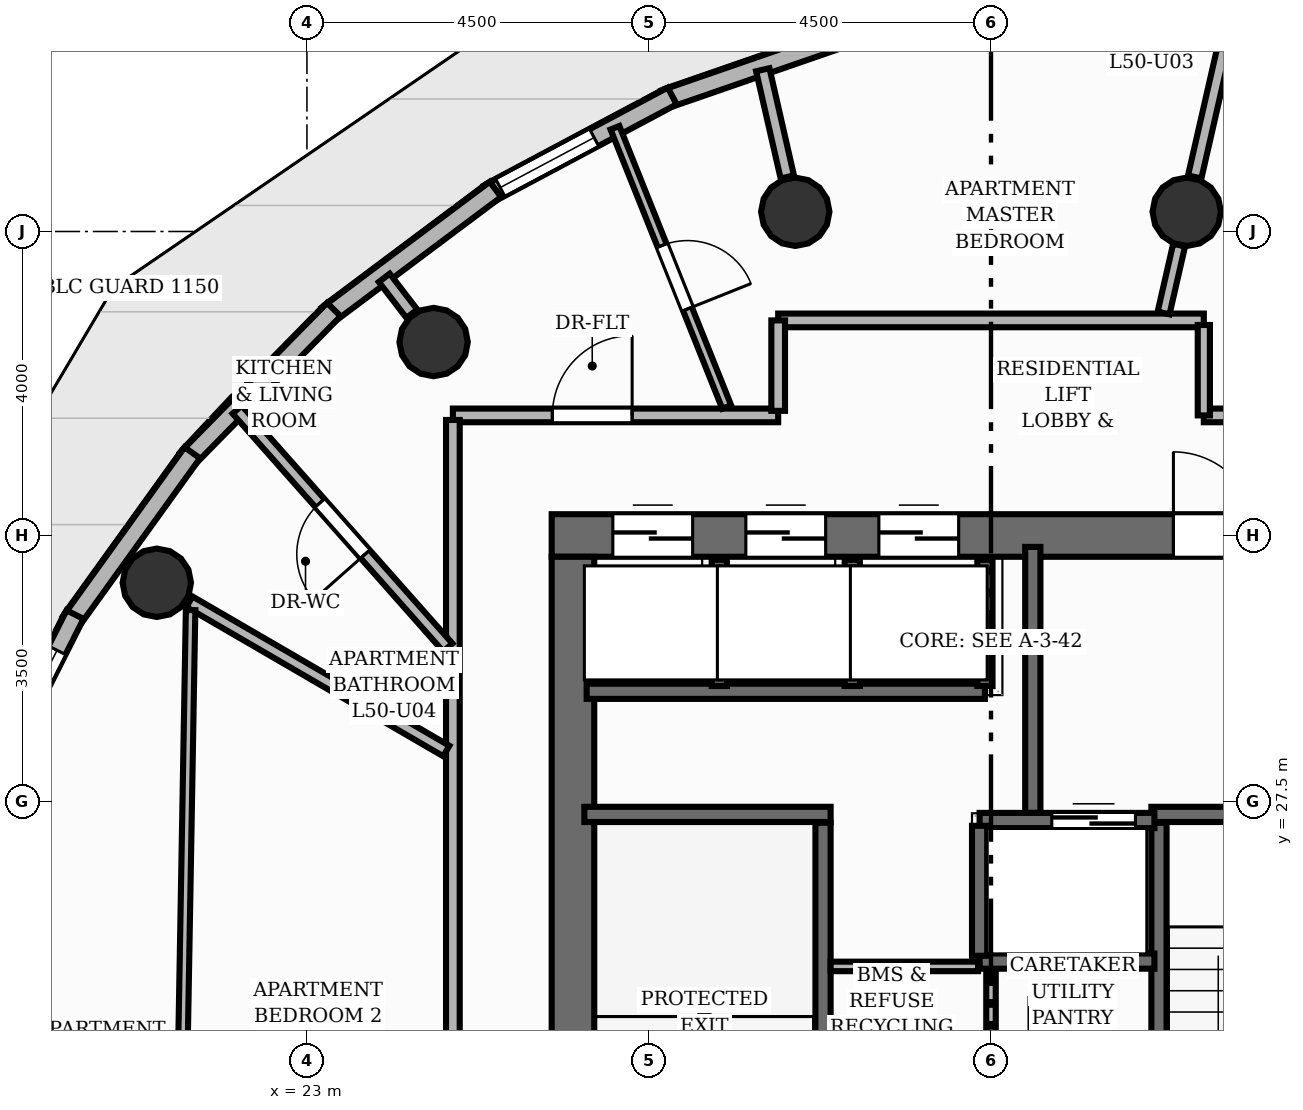
"""IFC4 building model, lengths in metres.
Left out: names, types, materials, properties, quantities, classifications, styles, units other than length and angle.
Written with IfcOpenShell. Run it as: python <this file> out.ifc"""

import sys

from ifc_helpers import new_model, si_unit, direction, frame, frame_2d, origin, origin_2d, place, context, subcontext, project, spatial, rectangle, circle, extrude, element, fill, save


model = new_model("IFC4")
c1 = context("Model", 3, precision=1e-05, world=origin(), true_north=direction((0.0, 1.0)))
c2 = subcontext(c1, "Body", "Model", "MODEL_VIEW")
j1 = project(units=[si_unit("LENGTHUNIT", "METRE"), si_unit("PLANEANGLEUNIT", "RADIAN")], contexts=[c1])
p1 = place(None, origin())
s1 = spatial("IfcSite", under=j1, at=p1, CompositionType="ELEMENT")
p2 = place(p1, origin())
s2 = spatial("IfcBuilding", under=s1, at=p2, CompositionType="ELEMENT")
p3 = place(p2, frame((0.0, 0.0, 169.44)))
s3 = spatial("IfcBuildingStorey", under=s2, at=p3, CompositionType="ELEMENT", Elevation=169.44)
p4 = place(p3, frame((26.22, 31.0, 0.0), z_axis=(0.0, 0.0, 1.0), x_axis=(1.0, 0.0, 0.0)))
e1 = element("IfcWall", 1, at=p4, inside=s3, PredefinedType="SHEAR", context=c2, shape_type="SweptSolid", body=[
    extrude(rectangle(XDim=11.56, YDim=0.56, at=frame_2d((5.78, 0.0))), origin(), (0.0, 0.0, 1.0), 3.2),
])
p5 = place(p4, frame((8.18, 0.0, 0.0)))
e2 = element("IfcOpeningElement", 2, at=p5, cuts=e1, PredefinedType="OPENING", context=c2, shape_type="SweptSolid", body=[
    extrude(rectangle(XDim=1.1, YDim=2.15, at=frame_2d((0.55, 1.075))), frame((0.0, 0.29, 0.0), z_axis=(0.0, -1.0, 0.0), x_axis=(1.0, 0.0, 0.0)), (0.0, 0.0, 1.0), 0.58),
])
p6 = place(p4, frame((0.805, 0.0, 0.0)))
e3 = element("IfcOpeningElement", 3, at=p6, cuts=e1, PredefinedType="OPENING", context=c2, shape_type="SweptSolid", body=[
    extrude(rectangle(XDim=1.05, YDim=2.15, at=frame_2d((0.525, 1.075))), frame((0.0, 0.29, 0.0), z_axis=(0.0, -1.0, 0.0), x_axis=(1.0, 0.0, 0.0)), (0.0, 0.0, 1.0), 0.58),
])
p7 = place(p4, frame((2.555, 0.0, 0.0)))
e4 = element("IfcOpeningElement", 4, at=p7, cuts=e1, PredefinedType="OPENING", context=c2, shape_type="SweptSolid", body=[
    extrude(rectangle(XDim=1.05, YDim=2.15, at=frame_2d((0.525, 1.075))), frame((0.0, 0.29, 0.0), z_axis=(0.0, -1.0, 0.0), x_axis=(1.0, 0.0, 0.0)), (0.0, 0.0, 1.0), 0.58),
])
p8 = place(p4, frame((4.305, 0.0, 0.0)))
e5 = element("IfcOpeningElement", 5, at=p8, cuts=e1, PredefinedType="OPENING", context=c2, shape_type="SweptSolid", body=[
    extrude(rectangle(XDim=1.05, YDim=2.15, at=frame_2d((0.525, 1.075))), frame((0.0, 0.29, 0.0), z_axis=(0.0, -1.0, 0.0), x_axis=(1.0, 0.0, 0.0)), (0.0, 0.0, 1.0), 0.58),
])
p9 = place(p3, frame((26.5, 17.28, 0.0), z_axis=(0.0, 0.0, 1.0), x_axis=(0.0, 1.0, 0.0)))
e6 = element("IfcWall", 6, at=p9, inside=s3, PredefinedType="SHEAR", context=c2, shape_type="SweptSolid", body=[
    extrude(rectangle(XDim=13.44, YDim=0.56, at=frame_2d((6.72, 0.0))), origin(), (0.0, 0.0, 1.0), 3.2),
])
for number, where, z_axis, x_axis in (
    (7, (34.575, 35.26, 0.0), (0.0, 0.0, 1.0), (1.0, 0.0, 0.0)),
    (8, (29.425, 35.26, 0.0), (0.0, 0.0, 1.0), (1.0, 0.0, 0.0)),
    (9, (24.667, 33.545, 0.0), (0.0, 0.0, 1.0), (1.0, 0.0, 0.0)),
    (10, (21.025, 30.378, 0.0), (0.0, 0.0, 1.0), (1.0, 0.0, 0.0)),
):
    element("IfcColumn", number, at=place(p3, frame(where, z_axis=z_axis, x_axis=x_axis)), inside=s3, PredefinedType="COLUMN", context=c2, shape_type="SweptSolid", body=[
        extrude(circle(Radius=0.45, at=origin_2d()), origin(), (0.0, 0.0, 1.0), 3.2),
    ])
p10 = place(p3, frame((27.705, 36.739, 0.0), z_axis=(0.0, 0.0, 1.0), x_axis=(0.945016150651, 0.327023661236, 0.0)))
e11 = element("IfcWall", 11, at=p10, inside=s3, PredefinedType="SOLIDWALL", context=c2, shape_type="SweptSolid", body=[
    extrude(rectangle(XDim=2.702, YDim=0.25, at=frame_2d((1.351, 0.0))), origin(), (0.0, 0.0, 1.0), 2.96),
])
p11 = place(p3, frame((25.388, 35.495, 0.0), z_axis=(0.0, 0.0, 1.0), x_axis=(0.88257494418, 0.47017174299, 0.0)))
e12 = element("IfcWall", 12, at=p11, inside=s3, PredefinedType="SOLIDWALL", context=c2, shape_type="SweptSolid", body=[
    extrude(rectangle(XDim=2.739, YDim=0.25, at=frame_2d((1.369, 0.0))), origin(), (0.0, 0.0, 1.0), 2.96),
])
p12 = place(p11, frame((0.175, 0.0, 0.85)))
e13 = element("IfcOpeningElement", 13, at=p12, cuts=e12, PredefinedType="OPENING", context=c2, shape_type="SweptSolid", body=[
    extrude(rectangle(XDim=1.4, YDim=1.55, at=frame_2d((0.7, 0.775))), frame((0.0, 0.135, 0.0), z_axis=(0.0, -1.0, 0.0), x_axis=(1.0, 0.0, 0.0)), (0.0, 0.0, 1.0), 0.27),
])
p13 = place(p3, frame((23.272, 33.901, 0.0), z_axis=(0.0, 0.0, 1.0), x_axis=(0.800636941996, 0.599149803564, 0.0)))
e14 = element("IfcWall", 14, at=p13, inside=s3, PredefinedType="SOLIDWALL", context=c2, shape_type="SweptSolid", body=[
    extrude(rectangle(XDim=2.758, YDim=0.25, at=frame_2d((1.379, 0.0))), origin(), (0.0, 0.0, 1.0), 2.96),
])
p14 = place(p3, frame((21.421, 32.005, 0.0), z_axis=(0.0, 0.0, 1.0), x_axis=(0.700794099323, 0.713363603189, 0.0)))
e15 = element("IfcWall", 15, at=p14, inside=s3, PredefinedType="SOLIDWALL", context=c2, shape_type="SweptSolid", body=[
    extrude(rectangle(XDim=2.758, YDim=0.25, at=frame_2d((1.379, 0.0))), origin(), (0.0, 0.0, 1.0), 2.96),
])
p15 = place(p3, frame((19.892, 29.865, 0.0), z_axis=(0.0, 0.0, 1.0), x_axis=(0.583975860001, 0.811771023711, 0.0)))
e16 = element("IfcWall", 16, at=p15, inside=s3, PredefinedType="SOLIDWALL", context=c2, shape_type="SweptSolid", body=[
    extrude(rectangle(XDim=2.738, YDim=0.25, at=frame_2d((1.369, 0.0))), origin(), (0.0, 0.0, 1.0), 2.96),
])
p16 = place(p3, frame((18.732, 27.547, 0.0), z_axis=(0.0, 0.0, 1.0), x_axis=(0.450391703917, 0.892831066352, 0.0)))
e17 = element("IfcWall", 17, at=p16, inside=s3, PredefinedType="SOLIDWALL", context=c2, shape_type="SweptSolid", body=[
    extrude(rectangle(XDim=2.702, YDim=0.25, at=frame_2d((1.351, 0.0))), origin(), (0.0, 0.0, 1.0), 2.96),
])
p17 = place(p16, frame((0.526, 0.0, 0.85)))
e18 = element("IfcOpeningElement", 18, at=p17, cuts=e17, PredefinedType="OPENING", context=c2, shape_type="SweptSolid", body=[
    extrude(rectangle(XDim=1.65, YDim=1.55, at=frame_2d((0.825, 0.775))), frame((0.0, 0.135, 0.0), z_axis=(0.0, -1.0, 0.0), x_axis=(1.0, 0.0, 0.0)), (0.0, 0.0, 1.0), 0.27),
])
p18 = place(p3, frame((29.79, 20.78, 0.0), z_axis=(0.0, 0.0, 1.0), x_axis=(0.0, 1.0, 0.0)))
e19 = element("IfcWall", 19, at=p18, inside=s3, PredefinedType="SHEAR", context=c2, shape_type="SweptSolid", body=[
    extrude(rectangle(XDim=6.44, YDim=0.2, at=frame_2d((3.22, 0.0))), origin(), (0.0, 0.0, 1.0), 3.2),
])
p19 = place(p3, frame((26.65, 27.33, 0.0), z_axis=(0.0, 0.0, 1.0), x_axis=(1.0, 0.0, 0.0)))
e20 = element("IfcWall", 20, at=p19, inside=s3, PredefinedType="SHEAR", context=c2, shape_type="SweptSolid", body=[
    extrude(rectangle(XDim=3.24, YDim=0.2, at=frame_2d((1.62, 0.0))), origin(), (0.0, 0.0, 1.0), 3.2),
])
p20 = place(p3, frame((34.21, 20.78, 0.0), z_axis=(0.0, 0.0, 1.0), x_axis=(0.0, 1.0, 0.0)))
e21 = element("IfcWall", 21, at=p20, inside=s3, PredefinedType="SHEAR", context=c2, shape_type="SweptSolid", body=[
    extrude(rectangle(XDim=6.44, YDim=0.2, at=frame_2d((3.22, 0.0))), origin(), (0.0, 0.0, 1.0), 3.2),
])
p21 = place(p3, frame((34.11, 27.33, 0.0), z_axis=(0.0, 0.0, 1.0), x_axis=(1.0, 0.0, 0.0)))
e22 = element("IfcWall", 22, at=p21, inside=s3, PredefinedType="SHEAR", context=c2, shape_type="SweptSolid", body=[
    extrude(rectangle(XDim=3.24, YDim=0.2, at=frame_2d((1.62, 0.0))), origin(), (0.0, 0.0, 1.0), 3.2),
])
p22 = place(p21, frame((1.135, 0.0, 0.0)))
e23 = element("IfcOpeningElement", 23, at=p22, cuts=e22, PredefinedType="OPENING", context=c2, shape_type="SweptSolid", body=[
    extrude(rectangle(XDim=1.05, YDim=2.15, at=frame_2d((0.525, 1.075))), frame((0.0, 0.11, 0.0), z_axis=(0.0, -1.0, 0.0), x_axis=(1.0, 0.0, 0.0)), (0.0, 0.0, 1.0), 0.22),
])
p23 = place(p3, frame((32.55, 27.35, 0.0), z_axis=(0.0, 0.0, 1.0), x_axis=(0.0, 1.0, 0.0)))
e24 = element("IfcWall", 24, at=p23, inside=s3, PredefinedType="SHEAR", context=c2, shape_type="SweptSolid", body=[
    extrude(rectangle(XDim=3.5, YDim=0.2, at=frame_2d((1.75, 0.0))), origin(), (0.0, 0.0, 1.0), 3.2),
])
p24 = place(p3, frame((31.85, 27.25, 0.0), z_axis=(0.0, 0.0, 1.0), x_axis=(1.0, 0.0, 0.0)))
e25 = element("IfcWall", 25, at=p24, inside=s3, PredefinedType="SHEAR", context=c2, shape_type="SweptSolid", body=[
    extrude(rectangle(XDim=2.3, YDim=0.2, at=frame_2d((1.15, 0.0))), origin(), (0.0, 0.0, 1.0), 3.2),
])
p25 = place(p24, frame((0.95, 0.0, 0.0)))
e26 = element("IfcOpeningElement", 26, at=p25, cuts=e25, PredefinedType="OPENING", context=c2, shape_type="SweptSolid", body=[
    extrude(rectangle(XDim=1.1, YDim=2.15, at=frame_2d((0.55, 1.075))), frame((0.0, 0.11, 0.0), z_axis=(0.0, -1.0, 0.0), x_axis=(1.0, 0.0, 0.0)), (0.0, 0.0, 1.0), 0.22),
])
p26 = place(p3, frame((31.85, 25.4, 0.0), z_axis=(0.0, 0.0, 1.0), x_axis=(1.0, 0.0, 0.0)))
e27 = element("IfcWall", 27, at=p26, inside=s3, PredefinedType="SHEAR", context=c2, shape_type="SweptSolid", body=[
    extrude(rectangle(XDim=2.3, YDim=0.2, at=frame_2d((1.15, 0.0))), origin(), (0.0, 0.0, 1.0), 3.2),
])
p27 = place(p3, frame((31.85, 25.47, 0.0), z_axis=(0.0, 0.0, 1.0), x_axis=(0.0, 1.0, 0.0)))
e28 = element("IfcWall", 28, at=p27, inside=s3, PredefinedType="SHEAR", context=c2, shape_type="SweptSolid", body=[
    extrude(rectangle(XDim=1.71, YDim=0.2, at=frame_2d((0.855, 0.0))), origin(), (0.0, 0.0, 1.0), 3.2),
])
p28 = place(p3, frame((26.68, 28.95, 0.0), z_axis=(0.0, 0.0, 1.0), x_axis=(1.0, 0.0, 0.0)))
e29 = element("IfcWall", 29, at=p28, inside=s3, PredefinedType="SHEAR", context=c2, shape_type="SweptSolid", body=[
    extrude(rectangle(XDim=5.24, YDim=0.2, at=frame_2d((2.62, 0.0))), origin(), (0.0, 0.0, 1.0), 3.2),
])
for number, where, z_axis, x_axis in (
    (30, (31.92, 29.02, 0.0), (0.0, 0.0, 1.0), (0.0, 1.0, 0.0)),
    (31, (28.425, 29.02, 0.0), (0.0, 0.0, 1.0), (0.0, 1.0, 0.0)),
    (32, (30.175, 29.02, 0.0), (0.0, 0.0, 1.0), (0.0, 1.0, 0.0)),
):
    element("IfcWall", number, at=place(p3, frame(where, z_axis=z_axis, x_axis=x_axis)), inside=s3, PredefinedType="SHEAR", context=c2, shape_type="SweptSolid", body=[
        extrude(rectangle(XDim=1.66, YDim=0.2, at=frame_2d((0.83, 0.0))), origin(), (0.0, 0.0, 1.0), 3.2),
    ])
p29 = place(p3, frame((32.0, 22.72, 0.0), z_axis=(0.0, 0.0, 1.0), x_axis=(0.0, 1.0, 0.0)))
e33 = element("IfcWall", 33, at=p29, inside=s3, PredefinedType="PARTITIONING", context=c2, shape_type="SweptSolid", body=[
    extrude(rectangle(XDim=2.52, YDim=0.125, at=frame_2d((1.26, 0.0))), origin(), (0.0, 0.0, 1.0), 2.955),
])
p30 = place(p29, frame((0.18, 0.0, 0.0)))
e34 = element("IfcOpeningElement", 34, at=p30, cuts=e33, PredefinedType="OPENING", context=c2, shape_type="SweptSolid", body=[
    extrude(rectangle(XDim=0.9, YDim=2.1, at=frame_2d((0.45, 1.05))), frame((0.0, 0.073, 0.0), z_axis=(0.0, -1.0, 0.0), x_axis=(1.0, 0.0, 0.0)), (0.0, 0.0, 1.0), 0.145),
])
p31 = place(p3, frame((29.89, 25.33, 0.0), z_axis=(0.0, 0.0, 1.0), x_axis=(1.0, 0.0, 0.0)))
e35 = element("IfcWall", 35, at=p31, inside=s3, PredefinedType="PARTITIONING", context=c2, shape_type="SweptSolid", body=[
    extrude(rectangle(XDim=1.94, YDim=0.125, at=frame_2d((0.97, 0.0))), origin(), (0.0, 0.0, 1.0), 2.955),
])
p32 = place(p3, frame((34.68, 35.718, 0.0), z_axis=(0.0, 0.0, 1.0), x_axis=(0.222998449778, 0.974818799263, 0.0)))
e36 = element("IfcWall", 36, at=p32, inside=s3, PredefinedType="PARTITIONING", context=c2, shape_type="SweptSolid", body=[
    extrude(rectangle(XDim=2.329, YDim=0.18, at=frame_2d((1.164, 0.0))), origin(), (0.0, 0.0, 1.0), 2.404),
])
p33 = place(p3, frame((29.32, 35.718, 0.0), z_axis=(0.0, 0.0, 1.0), x_axis=(-0.22299884629, 0.974818708557, 0.0)))
e37 = element("IfcWall", 37, at=p33, inside=s3, PredefinedType="PARTITIONING", context=c2, shape_type="SweptSolid", body=[
    extrude(rectangle(XDim=1.447, YDim=0.18, at=frame_2d((0.724, 0.0))), origin(), (0.0, 0.0, 1.0), 2.404),
])
p34 = place(p3, frame((24.38, 33.918, 0.0), z_axis=(0.0, 0.0, 1.0), x_axis=(-0.609274747308, 0.792959193334, 0.0)))
e38 = element("IfcWall", 38, at=p34, inside=s3, PredefinedType="PARTITIONING", context=c2, shape_type="SweptSolid", body=[
    extrude(rectangle(XDim=0.595, YDim=0.18, at=frame_2d((0.298, 0.0))), origin(), (0.0, 0.0, 1.0), 2.404),
])
p35 = place(p3, frame((34.8, 32.58, 0.0), z_axis=(0.0, 0.0, 1.0), x_axis=(1.0, 0.0, 0.0)))
e39 = element("IfcWall", 39, at=p35, inside=s3, PredefinedType="PARTITIONING", context=c2, shape_type="SweptSolid", body=[
    extrude(rectangle(XDim=4.28, YDim=0.18, at=frame_2d((2.14, 0.0))), origin(), (0.0, 0.0, 1.0), 2.955),
])
p36 = place(p35, frame((1.769, 0.0, 0.0)))
e40 = element("IfcOpeningElement", 40, at=p36, cuts=e39, PredefinedType="OPENING", context=c2, shape_type="SweptSolid", body=[
    extrude(rectangle(XDim=1.05, YDim=2.15, at=frame_2d((0.525, 1.075))), frame((0.0, 0.1, 0.0), z_axis=(0.0, -1.0, 0.0), x_axis=(1.0, 0.0, 0.0)), (0.0, 0.0, 1.0), 0.2),
])
p37 = place(p3, frame((29.2, 33.83, 0.0), z_axis=(0.0, 0.0, 1.0), x_axis=(1.0, 0.0, 0.0)))
e41 = element("IfcWall", 41, at=p37, inside=s3, PredefinedType="PARTITIONING", context=c2, shape_type="SweptSolid", body=[
    extrude(rectangle(XDim=5.6, YDim=0.18, at=frame_2d((2.8, 0.0))), origin(), (0.0, 0.0, 1.0), 2.955),
])
p38 = place(p3, frame((34.8, 33.77, 0.0), z_axis=(0.0, 0.0, 1.0), x_axis=(0.0, -1.0, 0.0)))
e42 = element("IfcWall", 42, at=p38, inside=s3, PredefinedType="PLUMBINGWALL", context=c2, shape_type="SweptSolid", body=[
    extrude(rectangle(XDim=1.19, YDim=0.16, at=frame_2d((0.595, 0.0))), origin(), (0.0, 0.0, 1.0), 2.955),
])
p39 = place(p3, frame((24.92, 32.58, 0.0), z_axis=(0.0, 0.0, 1.0), x_axis=(1.0, 0.0, 0.0)))
e43 = element("IfcWall", 43, at=p39, inside=s3, PredefinedType="PARTITIONING", context=c2, shape_type="SweptSolid", body=[
    extrude(rectangle(XDim=4.28, YDim=0.18, at=frame_2d((2.14, 0.0))), origin(), (0.0, 0.0, 1.0), 2.955),
])
p40 = place(p39, frame((1.309, 0.0, 0.0)))
e44 = element("IfcOpeningElement", 44, at=p40, cuts=e43, PredefinedType="OPENING", context=c2, shape_type="SweptSolid", body=[
    extrude(rectangle(XDim=1.05, YDim=2.15, at=frame_2d((0.525, 1.075))), frame((0.0, 0.1, 0.0), z_axis=(0.0, -1.0, 0.0), x_axis=(1.0, 0.0, 0.0)), (0.0, 0.0, 1.0), 0.2),
])
p41 = place(p3, frame((24.92, 20.85, 0.0), z_axis=(0.0, 0.0, 1.0), x_axis=(0.0, 1.0, 0.0)))
e45 = element("IfcWall", 45, at=p41, inside=s3, PredefinedType="PARTITIONING", context=c2, shape_type="SweptSolid", body=[
    extrude(rectangle(XDim=11.67, YDim=0.18, at=frame_2d((5.835, 0.0))), origin(), (0.0, 0.0, 1.0), 2.955),
])
p42 = place(p3, frame((29.2, 32.64, 0.0), z_axis=(0.0, 0.0, 1.0), x_axis=(0.0, 1.0, 0.0)))
e46 = element("IfcWall", 46, at=p42, inside=s3, PredefinedType="PARTITIONING", context=c2, shape_type="SweptSolid", body=[
    extrude(rectangle(XDim=1.19, YDim=0.18, at=frame_2d((0.595, 0.0))), origin(), (0.0, 0.0, 1.0), 2.955),
])
p43 = place(p3, frame((34.271, 33.927, 0.0), z_axis=(0.0, 0.0, 1.0), x_axis=(0.222991179816, 0.974820462303, 0.0)))
e47 = element("IfcWall", 47, at=p43, inside=s3, PredefinedType="PLUMBINGWALL", context=c2, shape_type="SweptSolid", body=[
    extrude(rectangle(XDim=0.917, YDim=0.16, at=frame_2d((0.458, 0.0))), origin(), (0.0, 0.0, 1.0), 2.404),
])
p44 = place(p3, frame((24.854, 29.527, 0.0), z_axis=(0.0, 0.0, 1.0), x_axis=(-0.663007196405, 0.748613022539, 0.0)))
e48 = element("IfcWall", 48, at=p44, inside=s3, PredefinedType="PLUMBINGWALL", context=c2, shape_type="SweptSolid", body=[
    extrude(rectangle(XDim=4.181, YDim=0.16, at=frame_2d((2.09, 0.0))), origin(), (0.0, 0.0, 1.0), 2.692),
])
p45 = place(p44, frame((1.64, 0.0, 0.0)))
e49 = element("IfcOpeningElement", 49, at=p45, cuts=e48, PredefinedType="OPENING", context=c2, shape_type="SweptSolid", body=[
    extrude(rectangle(XDim=0.9, YDim=2.1, at=frame_2d((0.45, 1.05))), frame((0.0, 0.09, 0.0), z_axis=(0.0, -1.0, 0.0), x_axis=(1.0, 0.0, 0.0)), (0.0, 0.0, 1.0), 0.18),
])
p46 = place(p3, frame((27.053, 36.365, 0.0), z_axis=(0.0, 0.0, 1.0), x_axis=(0.371454506587, -0.928451156247, 0.0)))
e50 = element("IfcWall", 50, at=p46, inside=s3, PredefinedType="PARTITIONING", context=c2, shape_type="SweptSolid", body=[
    extrude(rectangle(XDim=3.957, YDim=0.125, at=frame_2d((1.979, 0.0))), origin(), (0.0, 0.0, 1.0), 2.692),
])
p47 = place(p46, frame((1.668, 0.0, 0.0)))
e51 = element("IfcOpeningElement", 51, at=p47, cuts=e50, PredefinedType="OPENING", context=c2, shape_type="SweptSolid", body=[
    extrude(rectangle(XDim=0.9, YDim=2.1, at=frame_2d((0.45, 1.05))), frame((0.0, 0.073, 0.0), z_axis=(0.0, -1.0, 0.0), x_axis=(1.0, 0.0, 0.0)), (0.0, 0.0, 1.0), 0.145),
])
p48 = place(p3, frame((24.833, 28.164, 0.0), z_axis=(0.0, 0.0, 1.0), x_axis=(-0.864611299978, 0.50244133981, 0.0)))
e52 = element("IfcWall", 52, at=p48, inside=s3, PredefinedType="PLUMBINGWALL", context=c2, shape_type="SweptSolid", body=[
    extrude(rectangle(XDim=3.909, YDim=0.16, at=frame_2d((1.955, 0.0))), origin(), (0.0, 0.0, 1.0), 2.404),
])
p49 = place(p3, frame((21.469, 30.019, 0.0), z_axis=(0.0, 0.0, 1.0), x_axis=(-0.017526694913, -0.999846395686, 0.0)))
e53 = element("IfcWall", 53, at=p49, inside=s3, PredefinedType="PARTITIONING", context=c2, shape_type="SweptSolid", body=[
    extrude(rectangle(XDim=10.656, YDim=0.125, at=frame_2d((5.328, 0.0))), origin(), (0.0, 0.0, 1.0), 2.955),
])
p50 = place(p12, origin())
e54 = element("IfcWindow", 54, at=p50, inside=s3, PartitioningType="SINGLE_PANEL", PredefinedType="WINDOW", context=c2, shape_type="SweptSolid", body=[
    extrude(rectangle(XDim=1.4, YDim=1.55, at=frame_2d((0.7, 0.775))), frame((0.0, 0.03, 0.0), z_axis=(0.0, -1.0, 0.0), x_axis=(1.0, 0.0, 0.0)), (0.0, 0.0, 1.0), 0.06),
])
fill(e13, e54)
p51 = place(p17, origin())
e55 = element("IfcWindow", 55, at=p51, inside=s3, PartitioningType="SINGLE_PANEL", PredefinedType="WINDOW", context=c2, shape_type="SweptSolid", body=[
    extrude(rectangle(XDim=1.65, YDim=1.55, at=frame_2d((0.825, 0.775))), frame((0.0, 0.03, 0.0), z_axis=(0.0, -1.0, 0.0), x_axis=(1.0, 0.0, 0.0)), (0.0, 0.0, 1.0), 0.06),
])
fill(e18, e55)
p52 = place(p5, origin())
e56 = element("IfcDoor", 56, at=p52, inside=s3, OperationType="SINGLE_SWING_LEFT", PredefinedType="DOOR", context=c2, shape_type="SweptSolid", body=[
    extrude(rectangle(XDim=1.1, YDim=2.15, at=frame_2d((0.55, 1.075))), frame((0.0, 0.025, 0.0), z_axis=(0.0, -1.0, 0.0), x_axis=(1.0, 0.0, 0.0)), (0.0, 0.0, 1.0), 0.05),
])
fill(e2, e56)
p53 = place(p25, origin())
e57 = element("IfcDoor", 57, at=p53, inside=s3, OperationType="DOUBLE_DOOR_SLIDING", PredefinedType="DOOR", context=c2, shape_type="SweptSolid", body=[
    extrude(rectangle(XDim=1.1, YDim=2.15, at=frame_2d((0.55, 1.075))), frame((0.0, 0.025, 0.0), z_axis=(0.0, -1.0, 0.0), x_axis=(1.0, 0.0, 0.0)), (0.0, 0.0, 1.0), 0.05),
])
fill(e26, e57)
p54 = place(p6, origin())
e58 = element("IfcDoor", 58, at=p54, inside=s3, OperationType="DOUBLE_DOOR_SLIDING", PredefinedType="DOOR", context=c2, shape_type="SweptSolid", body=[
    extrude(rectangle(XDim=1.05, YDim=2.15, at=frame_2d((0.525, 1.075))), frame((0.0, 0.025, 0.0), z_axis=(0.0, -1.0, 0.0), x_axis=(1.0, 0.0, 0.0)), (0.0, 0.0, 1.0), 0.05),
])
fill(e3, e58)
p55 = place(p7, origin())
e59 = element("IfcDoor", 59, at=p55, inside=s3, OperationType="DOUBLE_DOOR_SLIDING", PredefinedType="DOOR", context=c2, shape_type="SweptSolid", body=[
    extrude(rectangle(XDim=1.05, YDim=2.15, at=frame_2d((0.525, 1.075))), frame((0.0, 0.025, 0.0), z_axis=(0.0, -1.0, 0.0), x_axis=(1.0, 0.0, 0.0)), (0.0, 0.0, 1.0), 0.05),
])
fill(e4, e59)
p56 = place(p8, origin())
e60 = element("IfcDoor", 60, at=p56, inside=s3, OperationType="DOUBLE_DOOR_SLIDING", PredefinedType="DOOR", context=c2, shape_type="SweptSolid", body=[
    extrude(rectangle(XDim=1.05, YDim=2.15, at=frame_2d((0.525, 1.075))), frame((0.0, 0.025, 0.0), z_axis=(0.0, -1.0, 0.0), x_axis=(1.0, 0.0, 0.0)), (0.0, 0.0, 1.0), 0.05),
])
fill(e5, e60)
p57 = place(p40, origin())
e61 = element("IfcDoor", 61, at=p57, inside=s3, OperationType="SINGLE_SWING_RIGHT", PredefinedType="DOOR", context=c2, shape_type="SweptSolid", body=[
    extrude(rectangle(XDim=1.05, YDim=2.15, at=frame_2d((0.525, 1.075))), frame((0.0, 0.025, 0.0), z_axis=(0.0, -1.0, 0.0), x_axis=(1.0, 0.0, 0.0)), (0.0, 0.0, 1.0), 0.05),
])
fill(e44, e61)
p58 = place(p45, origin())
e62 = element("IfcDoor", 62, at=p58, inside=s3, OperationType="SINGLE_SWING_LEFT", PredefinedType="DOOR", context=c2, shape_type="SweptSolid", body=[
    extrude(rectangle(XDim=0.9, YDim=2.1, at=frame_2d((0.45, 1.05))), frame((0.0, 0.025, 0.0), z_axis=(0.0, -1.0, 0.0), x_axis=(1.0, 0.0, 0.0)), (0.0, 0.0, 1.0), 0.05),
])
fill(e49, e62)
p59 = place(p47, origin())
e63 = element("IfcDoor", 63, at=p59, inside=s3, OperationType="SINGLE_SWING_RIGHT", PredefinedType="DOOR", context=c2, shape_type="SweptSolid", body=[
    extrude(rectangle(XDim=0.9, YDim=2.1, at=frame_2d((0.45, 1.05))), frame((0.0, 0.025, 0.0), z_axis=(0.0, -1.0, 0.0), x_axis=(1.0, 0.0, 0.0)), (0.0, 0.0, 1.0), 0.05),
])
fill(e51, e63)
save(model, sys.argv[1])
